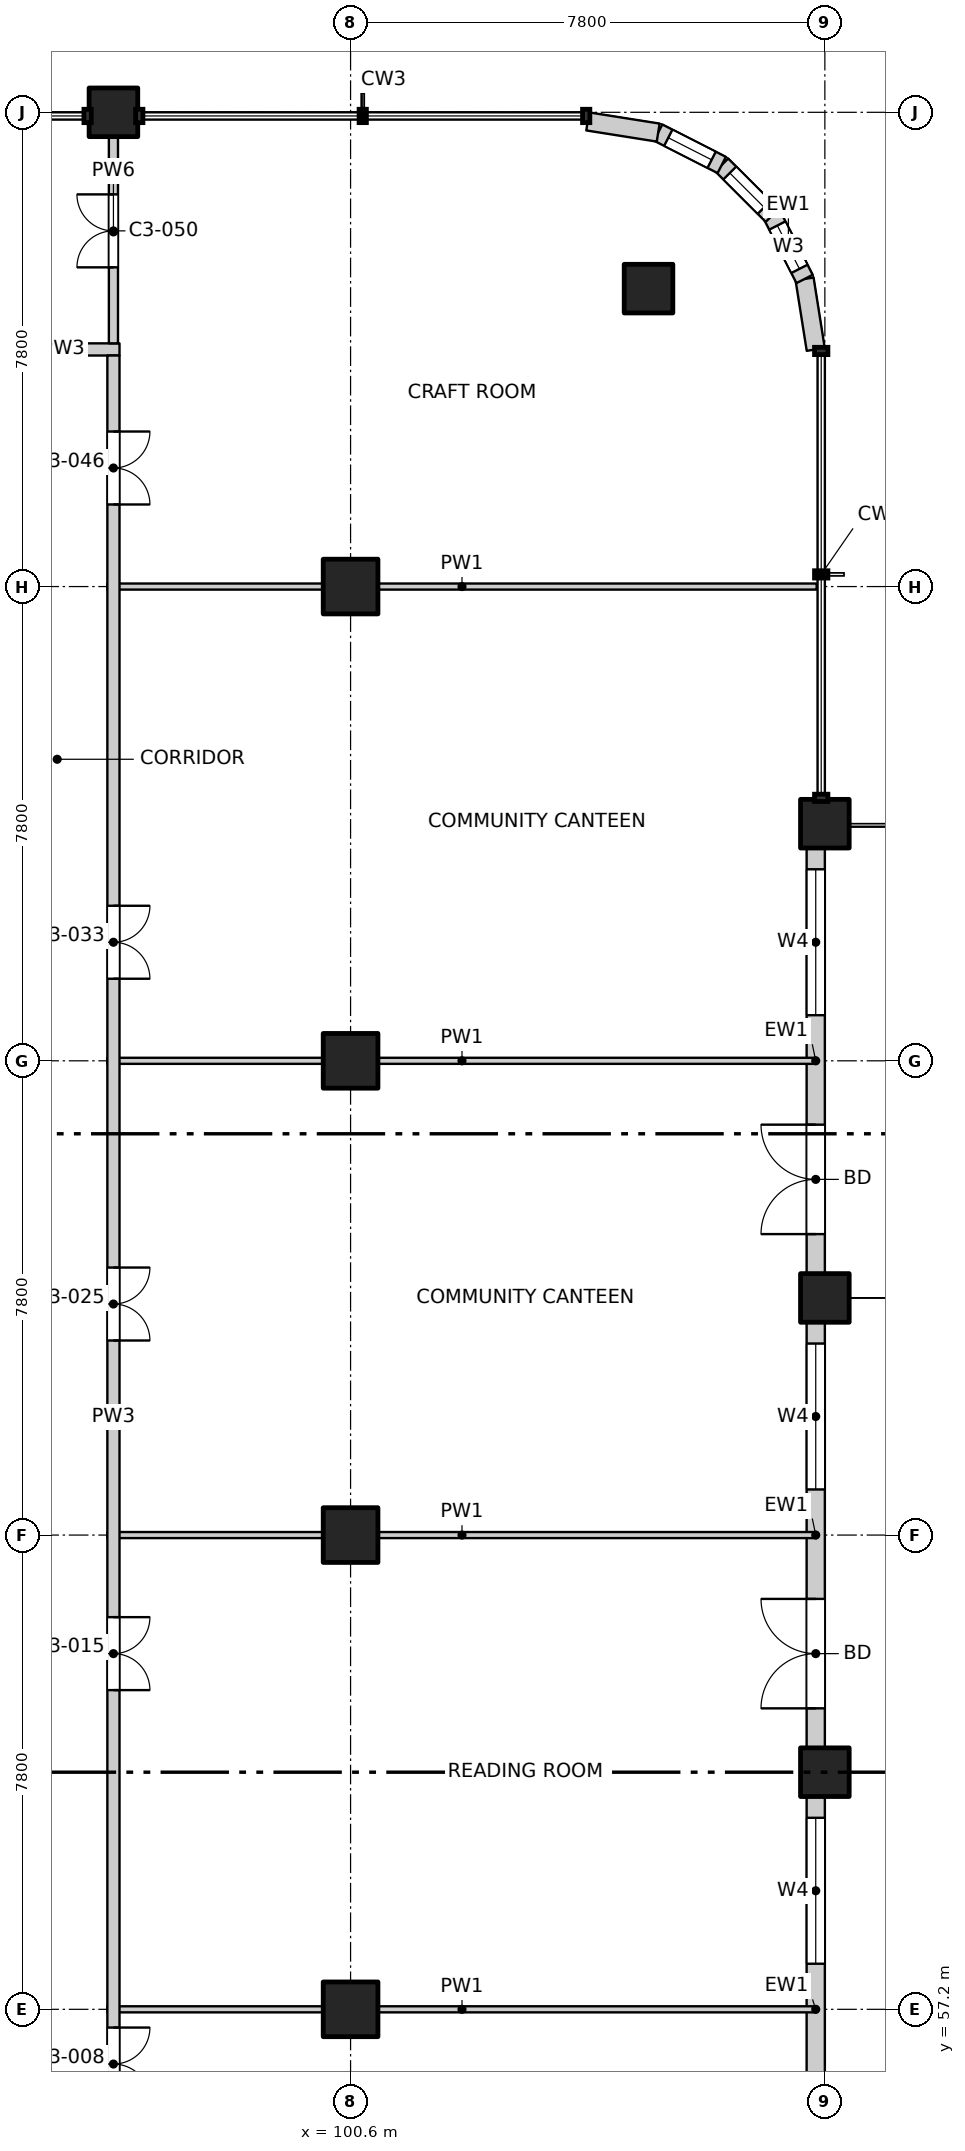
"""IFC4 building model, lengths in metres.
Left out: names, types, materials, properties, quantities, classifications, styles, units other than length and angle.
Written with IfcOpenShell. Run it as: python <this file> out.ifc"""

import sys

from ifc_helpers import new_model, si_unit, direction, frame, frame_2d, origin, origin_2d, place, context, subcontext, project, spatial, rectangle, extrude, element, fill, save


model = new_model("IFC4")
c1 = context("Model", 3, precision=1e-05, world=origin(), true_north=direction((0.0, 1.0)))
c2 = subcontext(c1, "Body", "Model", "MODEL_VIEW")
j1 = project(units=[si_unit("LENGTHUNIT", "METRE"), si_unit("PLANEANGLEUNIT", "RADIAN")], contexts=[c1])
p1 = place(None, origin())
s1 = spatial("IfcSite", under=j1, at=p1, CompositionType="ELEMENT")
p2 = place(p1, origin())
s2 = spatial("IfcBuilding", under=s1, at=p2, CompositionType="ELEMENT")
p3 = place(p2, frame((0.0, 0.0, 200.7)))
s3 = spatial("IfcBuildingStorey", under=s2, at=p3, CompositionType="ELEMENT", Elevation=200.7)
for number, where, z_axis, x_axis in (
    (1, (105.5, 85.5, -0.25), (0.0, 0.0, 1.0), (1.0, 0.0, 0.0)),
    (2, (108.4, 61.1, -0.25), (0.0, 0.0, 1.0), (1.0, 0.0, 0.0)),
    (3, (108.4, 68.9, -0.25), (0.0, 0.0, 1.0), (1.0, 0.0, 0.0)),
    (4, (108.4, 76.7, -0.25), (0.0, 0.0, 1.0), (1.0, 0.0, 0.0)),
    (5, (96.7, 88.4, -0.25), (0.0, 0.0, 1.0), (1.0, 0.0, 0.0)),
):
    element("IfcColumn", number, at=place(p3, frame(where, z_axis=z_axis, x_axis=x_axis)), inside=s3, PredefinedType="COLUMN", context=c2, shape_type="SweptSolid", body=[
        extrude(rectangle(XDim=0.8, YDim=0.8, at=origin_2d()), origin(), (0.0, 0.0, 1.0), 3.4),
    ])
for number, where, z_axis, x_axis in (
    (6, (100.6, 57.2, -0.25), (0.0, 0.0, 1.0), (1.0, 0.0, 0.0)),
    (7, (100.6, 65.0, -0.25), (0.0, 0.0, 1.0), (1.0, 0.0, 0.0)),
    (8, (100.6, 72.8, -0.25), (0.0, 0.0, 1.0), (1.0, 0.0, 0.0)),
    (9, (100.6, 80.6, -0.25), (0.0, 0.0, 1.0), (1.0, 0.0, 0.0)),
):
    element("IfcColumn", number, at=place(p3, frame(where, z_axis=z_axis, x_axis=x_axis)), inside=s3, PredefinedType="COLUMN", context=c2, shape_type="SweptSolid", body=[
        extrude(rectangle(XDim=0.9, YDim=0.9, at=origin_2d()), origin(), (0.0, 0.0, 1.0), 3.4),
    ])
p4 = place(p3, frame((108.25, 53.7, 0.0), z_axis=(0.0, 0.0, 1.0), x_axis=(0.0, 1.0, 0.0)))
e10 = element("IfcWall", 10, at=p4, inside=s3, PredefinedType="SOLIDWALL", context=c2, shape_type="SweptSolid", body=[
    extrude(rectangle(XDim=7.0, YDim=0.3, at=frame_2d((3.5, 0.0))), origin(), (0.0, 0.0, 1.0), 2.7),
])
p5 = place(p4, frame((0.65, 0.0, 0.0)))
e11 = element("IfcOpeningElement", 11, at=p5, cuts=e10, PredefinedType="OPENING", context=c2, shape_type="SweptSolid", body=[
    extrude(rectangle(XDim=1.8, YDim=2.4, at=frame_2d((0.9, 1.2))), frame((0.0, 0.16, 0.0), z_axis=(0.0, -1.0, 0.0), x_axis=(1.0, 0.0, 0.0)), (0.0, 0.0, 1.0), 0.32),
])
p6 = place(p4, frame((4.25, 0.0, 0.6)))
e12 = element("IfcOpeningElement", 12, at=p6, cuts=e10, PredefinedType="OPENING", context=c2, shape_type="SweptSolid", body=[
    extrude(rectangle(XDim=2.4, YDim=2.1, at=frame_2d((1.2, 1.05))), frame((0.0, 0.16, 0.0), z_axis=(0.0, -1.0, 0.0), x_axis=(1.0, 0.0, 0.0)), (0.0, 0.0, 1.0), 0.32),
])
p7 = place(p3, frame((108.25, 61.5, 0.0), z_axis=(0.0, 0.0, 1.0), x_axis=(0.0, 1.0, 0.0)))
e13 = element("IfcWall", 13, at=p7, inside=s3, PredefinedType="SOLIDWALL", context=c2, shape_type="SweptSolid", body=[
    extrude(rectangle(XDim=7.0, YDim=0.3, at=frame_2d((3.5, 0.0))), origin(), (0.0, 0.0, 1.0), 2.7),
])
p8 = place(p7, frame((0.65, 0.0, 0.0)))
e14 = element("IfcOpeningElement", 14, at=p8, cuts=e13, PredefinedType="OPENING", context=c2, shape_type="SweptSolid", body=[
    extrude(rectangle(XDim=1.8, YDim=2.4, at=frame_2d((0.9, 1.2))), frame((0.0, 0.16, 0.0), z_axis=(0.0, -1.0, 0.0), x_axis=(1.0, 0.0, 0.0)), (0.0, 0.0, 1.0), 0.32),
])
p9 = place(p7, frame((4.25, 0.0, 0.6)))
e15 = element("IfcOpeningElement", 15, at=p9, cuts=e13, PredefinedType="OPENING", context=c2, shape_type="SweptSolid", body=[
    extrude(rectangle(XDim=2.4, YDim=2.1, at=frame_2d((1.2, 1.05))), frame((0.0, 0.16, 0.0), z_axis=(0.0, -1.0, 0.0), x_axis=(1.0, 0.0, 0.0)), (0.0, 0.0, 1.0), 0.32),
])
p10 = place(p3, frame((108.25, 69.3, 0.0), z_axis=(0.0, 0.0, 1.0), x_axis=(0.0, 1.0, 0.0)))
e16 = element("IfcWall", 16, at=p10, inside=s3, PredefinedType="SOLIDWALL", context=c2, shape_type="SweptSolid", body=[
    extrude(rectangle(XDim=7.0, YDim=0.3, at=frame_2d((3.5, 0.0))), origin(), (0.0, 0.0, 1.0), 2.7),
])
p11 = place(p10, frame((0.65, 0.0, 0.0)))
e17 = element("IfcOpeningElement", 17, at=p11, cuts=e16, PredefinedType="OPENING", context=c2, shape_type="SweptSolid", body=[
    extrude(rectangle(XDim=1.8, YDim=2.4, at=frame_2d((0.9, 1.2))), frame((0.0, 0.16, 0.0), z_axis=(0.0, -1.0, 0.0), x_axis=(1.0, 0.0, 0.0)), (0.0, 0.0, 1.0), 0.32),
])
p12 = place(p10, frame((4.25, 0.0, 0.6)))
e18 = element("IfcOpeningElement", 18, at=p12, cuts=e16, PredefinedType="OPENING", context=c2, shape_type="SweptSolid", body=[
    extrude(rectangle(XDim=2.4, YDim=2.1, at=frame_2d((1.2, 1.05))), frame((0.0, 0.16, 0.0), z_axis=(0.0, -1.0, 0.0), x_axis=(1.0, 0.0, 0.0)), (0.0, 0.0, 1.0), 0.32),
])
p13 = place(p3, frame((108.25, 84.5, 0.0), z_axis=(0.0, 0.0, 1.0), x_axis=(-0.156496880861, 0.987678452879, 0.0)))
e19 = element("IfcWall", 19, at=p13, inside=s3, PredefinedType="SOLIDWALL", context=c2, shape_type="SweptSolid", body=[
    extrude(rectangle(XDim=1.173, YDim=0.3, at=frame_2d((0.586, 0.0))), origin(), (0.0, 0.0, 1.0), 2.7),
])
p14 = place(p3, frame((108.066, 85.659, 0.0), z_axis=(0.0, 0.0, 1.0), x_axis=(-0.454025524128, 0.890988677504, 0.0)))
e20 = element("IfcWall", 20, at=p14, inside=s3, PredefinedType="SOLIDWALL", context=c2, shape_type="SweptSolid", body=[
    extrude(rectangle(XDim=1.173, YDim=0.3, at=frame_2d((0.587, 0.0))), origin(), (0.0, 0.0, 1.0), 2.7),
])
p15 = place(p14, frame((0.187, 0.0, 0.9)))
e21 = element("IfcOpeningElement", 21, at=p15, cuts=e20, PredefinedType="OPENING", context=c2, shape_type="SweptSolid", body=[
    extrude(rectangle(XDim=0.8, YDim=1.2, at=frame_2d((0.4, 0.6))), frame((0.0, 0.16, 0.0), z_axis=(0.0, -1.0, 0.0), x_axis=(1.0, 0.0, 0.0)), (0.0, 0.0, 1.0), 0.32),
])
p16 = place(p3, frame((107.534, 86.704, 0.0), z_axis=(0.0, 0.0, 1.0), x_axis=(-0.707106781187, 0.707106781187, 0.0)))
e22 = element("IfcWall", 22, at=p16, inside=s3, PredefinedType="SOLIDWALL", context=c2, shape_type="SweptSolid", body=[
    extrude(rectangle(XDim=1.173, YDim=0.3, at=frame_2d((0.586, 0.0))), origin(), (0.0, 0.0, 1.0), 2.7),
])
p17 = place(p16, frame((0.187, 0.0, 0.9)))
e23 = element("IfcOpeningElement", 23, at=p17, cuts=e22, PredefinedType="OPENING", context=c2, shape_type="SweptSolid", body=[
    extrude(rectangle(XDim=0.8, YDim=1.2, at=frame_2d((0.4, 0.6))), frame((0.0, 0.16, 0.0), z_axis=(0.0, -1.0, 0.0), x_axis=(1.0, 0.0, 0.0)), (0.0, 0.0, 1.0), 0.32),
])
p18 = place(p3, frame((106.704, 87.534, 0.0), z_axis=(0.0, 0.0, 1.0), x_axis=(-0.890988677504, 0.454025524128, 0.0)))
e24 = element("IfcWall", 24, at=p18, inside=s3, PredefinedType="SOLIDWALL", context=c2, shape_type="SweptSolid", body=[
    extrude(rectangle(XDim=1.173, YDim=0.3, at=frame_2d((0.587, 0.0))), origin(), (0.0, 0.0, 1.0), 2.7),
])
p19 = place(p18, frame((0.187, 0.0, 0.9)))
e25 = element("IfcOpeningElement", 25, at=p19, cuts=e24, PredefinedType="OPENING", context=c2, shape_type="SweptSolid", body=[
    extrude(rectangle(XDim=0.8, YDim=1.2, at=frame_2d((0.4, 0.6))), frame((0.0, 0.16, 0.0), z_axis=(0.0, -1.0, 0.0), x_axis=(1.0, 0.0, 0.0)), (0.0, 0.0, 1.0), 0.32),
])
p20 = place(p3, frame((105.659, 88.066, 0.0), z_axis=(0.0, 0.0, 1.0), x_axis=(-0.987678452879, 0.156496880861, 0.0)))
e26 = element("IfcWall", 26, at=p20, inside=s3, PredefinedType="SOLIDWALL", context=c2, shape_type="SweptSolid", body=[
    extrude(rectangle(XDim=1.173, YDim=0.3, at=frame_2d((0.586, 0.0))), origin(), (0.0, 0.0, 1.0), 2.7),
])
for number, where, z_axis, x_axis in (
    (27, (96.6, 57.2, 0.0), (0.0, 0.0, 1.0), (1.0, 0.0, 0.0)),
    (28, (96.6, 65.0, 0.0), (0.0, 0.0, 1.0), (1.0, 0.0, 0.0)),
    (29, (96.6, 72.8, 0.0), (0.0, 0.0, 1.0), (1.0, 0.0, 0.0)),
    (30, (96.6, 80.6, 0.0), (0.0, 0.0, 1.0), (1.0, 0.0, 0.0)),
):
    element("IfcWall", number, at=place(p3, frame(where, z_axis=z_axis, x_axis=x_axis)), inside=s3, PredefinedType="PARTITIONING", context=c2, shape_type="SweptSolid", body=[
        extrude(rectangle(XDim=11.665, YDim=0.1, at=frame_2d((5.833, 0.0))), origin(), (0.0, 0.0, 1.0), 3.15),
    ])
p21 = place(p3, frame((94.95, 84.5, 0.0), z_axis=(0.0, 0.0, 1.0), x_axis=(1.0, 0.0, 0.0)))
e31 = element("IfcWall", 31, at=p21, inside=s3, PredefinedType="PARTITIONING", context=c2, shape_type="SweptSolid", body=[
    extrude(rectangle(XDim=1.85, YDim=0.2, at=frame_2d((0.925, 0.0))), origin(), (0.0, 0.0, 1.0), 3.15),
])
p22 = place(p3, frame((96.7, 49.5, 0.0), z_axis=(0.0, 0.0, 1.0), x_axis=(0.0, 1.0, 0.0)))
e32 = element("IfcWall", 32, at=p22, inside=s3, PredefinedType="PARTITIONING", context=c2, shape_type="SweptSolid", body=[
    extrude(rectangle(XDim=34.9, YDim=0.2, at=frame_2d((17.45, 0.0))), origin(), (0.0, 0.0, 1.0), 3.15),
])
p23 = place(p22, frame((6.2, 0.0, 0.0)))
e33 = element("IfcOpeningElement", 33, at=p23, cuts=e32, PredefinedType="OPENING", context=c2, shape_type="SweptSolid", body=[
    extrude(rectangle(XDim=1.2, YDim=2.1, at=frame_2d((0.6, 1.05))), frame((0.0, 0.11, 0.0), z_axis=(0.0, -1.0, 0.0), x_axis=(1.0, 0.0, 0.0)), (0.0, 0.0, 1.0), 0.22),
])
p24 = place(p22, frame((12.95, 0.0, 0.0)))
e34 = element("IfcOpeningElement", 34, at=p24, cuts=e32, PredefinedType="OPENING", context=c2, shape_type="SweptSolid", body=[
    extrude(rectangle(XDim=1.2, YDim=2.1, at=frame_2d((0.6, 1.05))), frame((0.0, 0.11, 0.0), z_axis=(0.0, -1.0, 0.0), x_axis=(1.0, 0.0, 0.0)), (0.0, 0.0, 1.0), 0.22),
])
p25 = place(p22, frame((18.7, 0.0, 0.0)))
e35 = element("IfcOpeningElement", 35, at=p25, cuts=e32, PredefinedType="OPENING", context=c2, shape_type="SweptSolid", body=[
    extrude(rectangle(XDim=1.2, YDim=2.1, at=frame_2d((0.6, 1.05))), frame((0.0, 0.11, 0.0), z_axis=(0.0, -1.0, 0.0), x_axis=(1.0, 0.0, 0.0)), (0.0, 0.0, 1.0), 0.22),
])
p26 = place(p22, frame((24.65, 0.0, 0.0)))
e36 = element("IfcOpeningElement", 36, at=p26, cuts=e32, PredefinedType="OPENING", context=c2, shape_type="SweptSolid", body=[
    extrude(rectangle(XDim=1.2, YDim=2.1, at=frame_2d((0.6, 1.05))), frame((0.0, 0.11, 0.0), z_axis=(0.0, -1.0, 0.0), x_axis=(1.0, 0.0, 0.0)), (0.0, 0.0, 1.0), 0.22),
])
p27 = place(p22, frame((32.45, 0.0, 0.0)))
e37 = element("IfcOpeningElement", 37, at=p27, cuts=e32, PredefinedType="OPENING", context=c2, shape_type="SweptSolid", body=[
    extrude(rectangle(XDim=1.2, YDim=2.1, at=frame_2d((0.6, 1.05))), frame((0.0, 0.11, 0.0), z_axis=(0.0, -1.0, 0.0), x_axis=(1.0, 0.0, 0.0)), (0.0, 0.0, 1.0), 0.22),
])
p28 = place(p3, frame((96.7, 84.6, 0.0), z_axis=(0.0, 0.0, 1.0), x_axis=(0.0, 1.0, 0.0)))
e38 = element("IfcWall", 38, at=p28, inside=s3, PredefinedType="PARTITIONING", context=c2, shape_type="SweptSolid", body=[
    extrude(rectangle(XDim=3.665, YDim=0.15, at=frame_2d((1.833, 0.0))), origin(), (0.0, 0.0, 1.0), 3.15),
])
p29 = place(p28, frame((1.25, 0.0, 0.0)))
e39 = element("IfcOpeningElement", 39, at=p29, cuts=e38, PredefinedType="OPENING", context=c2, shape_type="SweptSolid", body=[
    extrude(rectangle(XDim=1.2, YDim=2.1, at=frame_2d((0.6, 1.05))), frame((0.0, 0.085, 0.0), z_axis=(0.0, -1.0, 0.0), x_axis=(1.0, 0.0, 0.0)), (0.0, 0.0, 1.0), 0.17),
])
p30 = place(p6, origin())
e40 = element("IfcWindow", 40, at=p30, inside=s3, PartitioningType="SINGLE_PANEL", PredefinedType="WINDOW", context=c2, shape_type="SweptSolid", body=[
    extrude(rectangle(XDim=2.4, YDim=2.1, at=frame_2d((1.2, 1.05))), frame((0.0, 0.03, 0.0), z_axis=(0.0, -1.0, 0.0), x_axis=(1.0, 0.0, 0.0)), (0.0, 0.0, 1.0), 0.06),
])
fill(e12, e40)
p31 = place(p8, origin())
e41 = element("IfcDoor", 41, at=p31, inside=s3, OperationType="DOUBLE_DOOR_SINGLE_SWING", PredefinedType="DOOR", context=c2, shape_type="SweptSolid", body=[
    extrude(rectangle(XDim=1.8, YDim=2.4, at=frame_2d((0.9, 1.2))), frame((0.0, 0.025, 0.0), z_axis=(0.0, -1.0, 0.0), x_axis=(1.0, 0.0, 0.0)), (0.0, 0.0, 1.0), 0.05),
])
fill(e14, e41)
p32 = place(p9, origin())
e42 = element("IfcWindow", 42, at=p32, inside=s3, PartitioningType="SINGLE_PANEL", PredefinedType="WINDOW", context=c2, shape_type="SweptSolid", body=[
    extrude(rectangle(XDim=2.4, YDim=2.1, at=frame_2d((1.2, 1.05))), frame((0.0, 0.03, 0.0), z_axis=(0.0, -1.0, 0.0), x_axis=(1.0, 0.0, 0.0)), (0.0, 0.0, 1.0), 0.06),
])
fill(e15, e42)
p33 = place(p11, origin())
e43 = element("IfcDoor", 43, at=p33, inside=s3, OperationType="DOUBLE_DOOR_SINGLE_SWING", PredefinedType="DOOR", context=c2, shape_type="SweptSolid", body=[
    extrude(rectangle(XDim=1.8, YDim=2.4, at=frame_2d((0.9, 1.2))), frame((0.0, 0.025, 0.0), z_axis=(0.0, -1.0, 0.0), x_axis=(1.0, 0.0, 0.0)), (0.0, 0.0, 1.0), 0.05),
])
fill(e17, e43)
p34 = place(p12, origin())
e44 = element("IfcWindow", 44, at=p34, inside=s3, PartitioningType="SINGLE_PANEL", PredefinedType="WINDOW", context=c2, shape_type="SweptSolid", body=[
    extrude(rectangle(XDim=2.4, YDim=2.1, at=frame_2d((1.2, 1.05))), frame((0.0, 0.03, 0.0), z_axis=(0.0, -1.0, 0.0), x_axis=(1.0, 0.0, 0.0)), (0.0, 0.0, 1.0), 0.06),
])
fill(e18, e44)
p35 = place(p15, origin())
e45 = element("IfcWindow", 45, at=p35, inside=s3, PartitioningType="SINGLE_PANEL", PredefinedType="WINDOW", context=c2, shape_type="SweptSolid", body=[
    extrude(rectangle(XDim=0.8, YDim=1.2, at=frame_2d((0.4, 0.6))), frame((0.0, 0.03, 0.0), z_axis=(0.0, -1.0, 0.0), x_axis=(1.0, 0.0, 0.0)), (0.0, 0.0, 1.0), 0.06),
])
fill(e21, e45)
p36 = place(p17, origin())
e46 = element("IfcWindow", 46, at=p36, inside=s3, PartitioningType="SINGLE_PANEL", PredefinedType="WINDOW", context=c2, shape_type="SweptSolid", body=[
    extrude(rectangle(XDim=0.8, YDim=1.2, at=frame_2d((0.4, 0.6))), frame((0.0, 0.03, 0.0), z_axis=(0.0, -1.0, 0.0), x_axis=(1.0, 0.0, 0.0)), (0.0, 0.0, 1.0), 0.06),
])
fill(e23, e46)
p37 = place(p19, origin())
e47 = element("IfcWindow", 47, at=p37, inside=s3, PartitioningType="SINGLE_PANEL", PredefinedType="WINDOW", context=c2, shape_type="SweptSolid", body=[
    extrude(rectangle(XDim=0.8, YDim=1.2, at=frame_2d((0.4, 0.6))), frame((0.0, 0.03, 0.0), z_axis=(0.0, -1.0, 0.0), x_axis=(1.0, 0.0, 0.0)), (0.0, 0.0, 1.0), 0.06),
])
fill(e25, e47)
p38 = place(p23, origin())
e48 = element("IfcDoor", 48, at=p38, inside=s3, OperationType="DOUBLE_DOOR_SINGLE_SWING", PredefinedType="DOOR", context=c2, shape_type="SweptSolid", body=[
    extrude(rectangle(XDim=1.2, YDim=2.1, at=frame_2d((0.6, 1.05))), frame((0.0, 0.025, 0.0), z_axis=(0.0, -1.0, 0.0), x_axis=(1.0, 0.0, 0.0)), (0.0, 0.0, 1.0), 0.05),
])
fill(e33, e48)
p39 = place(p24, origin())
e49 = element("IfcDoor", 49, at=p39, inside=s3, OperationType="DOUBLE_DOOR_SINGLE_SWING", PredefinedType="DOOR", context=c2, shape_type="SweptSolid", body=[
    extrude(rectangle(XDim=1.2, YDim=2.1, at=frame_2d((0.6, 1.05))), frame((0.0, 0.025, 0.0), z_axis=(0.0, -1.0, 0.0), x_axis=(1.0, 0.0, 0.0)), (0.0, 0.0, 1.0), 0.05),
])
fill(e34, e49)
p40 = place(p25, origin())
e50 = element("IfcDoor", 50, at=p40, inside=s3, OperationType="DOUBLE_DOOR_SINGLE_SWING", PredefinedType="DOOR", context=c2, shape_type="SweptSolid", body=[
    extrude(rectangle(XDim=1.2, YDim=2.1, at=frame_2d((0.6, 1.05))), frame((0.0, 0.025, 0.0), z_axis=(0.0, -1.0, 0.0), x_axis=(1.0, 0.0, 0.0)), (0.0, 0.0, 1.0), 0.05),
])
fill(e35, e50)
p41 = place(p26, origin())
e51 = element("IfcDoor", 51, at=p41, inside=s3, OperationType="DOUBLE_DOOR_SINGLE_SWING", PredefinedType="DOOR", context=c2, shape_type="SweptSolid", body=[
    extrude(rectangle(XDim=1.2, YDim=2.1, at=frame_2d((0.6, 1.05))), frame((0.0, 0.025, 0.0), z_axis=(0.0, -1.0, 0.0), x_axis=(1.0, 0.0, 0.0)), (0.0, 0.0, 1.0), 0.05),
])
fill(e36, e51)
p42 = place(p27, origin())
e52 = element("IfcDoor", 52, at=p42, inside=s3, OperationType="DOUBLE_DOOR_SINGLE_SWING", PredefinedType="DOOR", context=c2, shape_type="SweptSolid", body=[
    extrude(rectangle(XDim=1.2, YDim=2.1, at=frame_2d((0.6, 1.05))), frame((0.0, 0.025, 0.0), z_axis=(0.0, -1.0, 0.0), x_axis=(1.0, 0.0, 0.0)), (0.0, 0.0, 1.0), 0.05),
])
fill(e37, e52)
p43 = place(p29, origin())
e53 = element("IfcDoor", 53, at=p43, inside=s3, OperationType="DOUBLE_DOOR_SINGLE_SWING", PredefinedType="DOOR", context=c2, shape_type="SweptSolid", body=[
    extrude(rectangle(XDim=1.2, YDim=2.1, at=frame_2d((0.6, 1.05))), frame((0.0, 0.025, 0.0), z_axis=(0.0, -1.0, 0.0), x_axis=(1.0, 0.0, 0.0)), (0.0, 0.0, 1.0), 0.05),
])
fill(e39, e53)
save(model, sys.argv[1])
